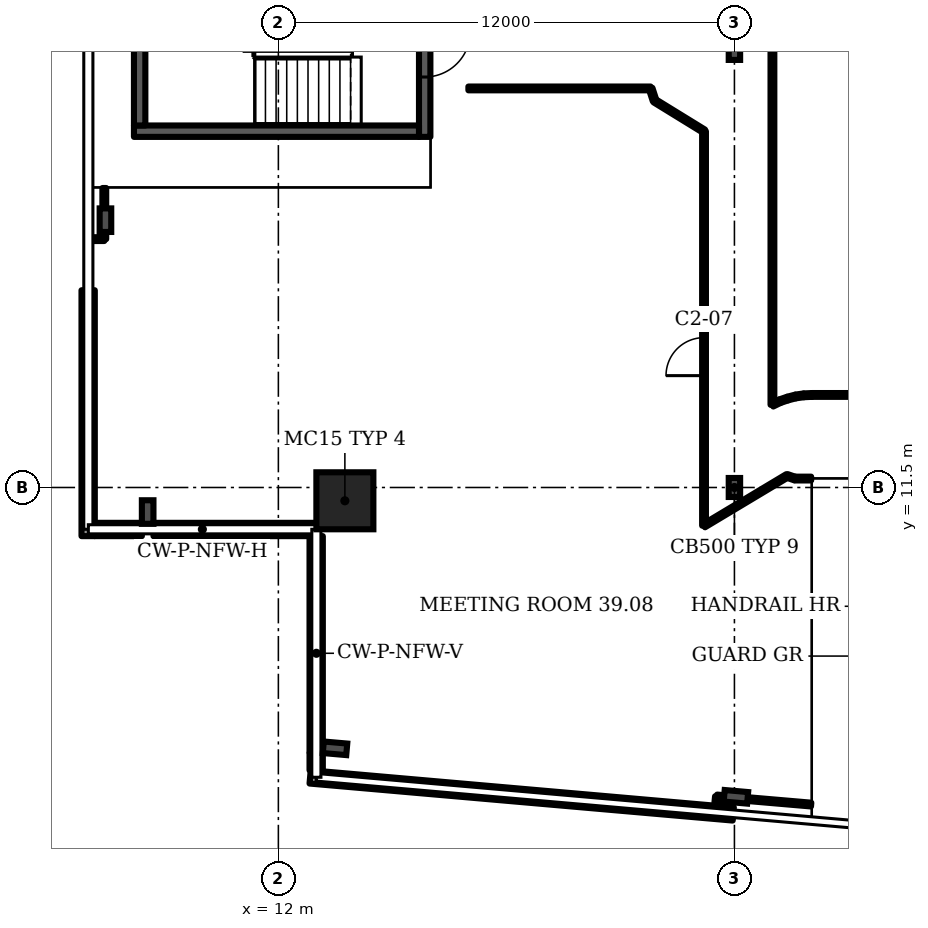
"""IFC4 building model, lengths in metres.
Left out: names, types, materials, properties, quantities, classifications, styles, units other than length and angle.
Written with IfcOpenShell. Run it as: python <this file> out.ifc"""

import sys

from ifc_helpers import new_model, si_unit, direction, frame, frame_2d, origin, origin_2d, place, context, subcontext, project, spatial, rectangle, i_section, extrude, element, fill, save


model = new_model("IFC4")
c1 = context("Model", 3, precision=1e-05, world=origin(), true_north=direction((0.0, 1.0)))
c2 = subcontext(c1, "Body", "Model", "MODEL_VIEW")
j1 = project(units=[si_unit("LENGTHUNIT", "METRE"), si_unit("PLANEANGLEUNIT", "RADIAN")], contexts=[c1])
p1 = place(None, origin())
s1 = spatial("IfcSite", under=j1, at=p1, CompositionType="ELEMENT")
p2 = place(p1, origin())
s2 = spatial("IfcBuilding", under=s1, at=p2, CompositionType="ELEMENT")
p3 = place(p2, frame((0.0, 0.0, 162.7)))
s3 = spatial("IfcBuildingStorey", under=s2, at=p3, CompositionType="ELEMENT", Elevation=162.7)
p4 = place(p3, frame((13.75, 11.15, 0.0), z_axis=(0.0, 0.0, 1.0), x_axis=(1.0, 0.0, 0.0)))
e1 = element("IfcColumn", 1, at=p4, inside=s3, PredefinedType="COLUMN", context=c2, shape_type="SweptSolid", body=[
    extrude(rectangle(XDim=1.5, YDim=1.5, at=origin_2d()), origin(), (0.0, 0.0, 1.0), 3.6),
])
for number, where, z_axis, x_axis in (
    (2, (13.491, 4.637, 0.0), (0.0, 0.0, 1.0), (-0.087, -0.996, 0.0)),
    (3, (24.039, 3.361, 0.0), (0.0, 0.0, 1.0), (-0.087, -0.996, 0.0)),
    (4, (7.45, 18.533, 0.0), (0.0, 0.0, 1.0), (-1.0, 0.0, 0.0)),
    (5, (8.561, 10.854, 0.0), (0.0, 0.0, 1.0), (-1.0, 0.0, 0.0)),
):
    element("IfcColumn", number, at=place(p3, frame(where, z_axis=z_axis, x_axis=x_axis)), inside=s3, PredefinedType="COLUMN", context=c2, shape_type="SweptSolid", body=[
        extrude(i_section(OverallWidth=0.305, OverallDepth=0.62, WebThickness=0.021, FlangeThickness=0.04, FilletRadius=0.027, at=origin_2d()), origin(), (0.0, 0.0, 1.0), 3.6),
    ])
for number, where, z_axis, x_axis in (
    (6, (24.0, 11.5, 0.0), (0.0, 0.0, 1.0), (1.0, 0.0, 0.0)),
    (7, (24.0, 23.0, 0.0), (0.0, 0.0, 1.0), (1.0, 0.0, 0.0)),
):
    element("IfcColumn", number, at=place(p3, frame(where, z_axis=z_axis, x_axis=x_axis)), inside=s3, PredefinedType="COLUMN", context=c2, shape_type="SweptSolid", body=[
        extrude(i_section(OverallWidth=0.3, OverallDepth=0.5, WebThickness=0.014, FlangeThickness=0.028, FilletRadius=0.027, at=origin_2d()), origin(), (0.0, 0.0, 1.0), 3.6),
    ])
p5 = place(p3, frame((12.835, 3.885, 0.0), z_axis=(0.0, 0.0, 1.0), x_axis=(0.996199, -0.087154, 0.0)))
e8 = element("IfcWall", 8, at=p5, inside=s3, PredefinedType="SOLIDWALL", context=c2, shape_type="SweptSolid", body=[
    extrude(rectangle(XDim=11.177, YDim=0.35, at=frame_2d((5.588, 0.0))), origin(), (0.0, 0.0, 1.0), 1.0),
])
p6 = place(p3, frame((6.995, 16.69, 0.0), z_axis=(0.0, 0.0, 1.0), x_axis=(0.0, -1.0, 0.0)))
e9 = element("IfcWall", 9, at=p6, inside=s3, PredefinedType="SOLIDWALL", context=c2, shape_type="SweptSolid", body=[
    extrude(rectangle(XDim=6.47, YDim=0.35, at=frame_2d((3.235, 0.0))), origin(), (0.0, 0.0, 1.0), 1.0),
])
p7 = place(p3, frame((7.17, 10.395, 0.0), z_axis=(0.0, 0.0, 1.0), x_axis=(1.0, 0.0, 0.0)))
e10 = element("IfcWall", 10, at=p7, inside=s3, PredefinedType="SOLIDWALL", context=c2, shape_type="SweptSolid", body=[
    extrude(rectangle(XDim=1.238, YDim=0.35, at=frame_2d((0.619, 0.0))), origin(), (0.0, 0.0, 1.0), 1.0),
])
p8 = place(p3, frame((8.713, 10.395, 0.0), z_axis=(0.0, 0.0, 1.0), x_axis=(1.0, 0.0, 0.0)))
e11 = element("IfcWall", 11, at=p8, inside=s3, PredefinedType="SOLIDWALL", context=c2, shape_type="SweptSolid", body=[
    extrude(rectangle(XDim=4.287, YDim=0.35, at=frame_2d((2.143, 0.0))), origin(), (0.0, 0.0, 1.0), 1.0),
])
p9 = place(p3, frame((12.995, 10.22, 0.0), z_axis=(0.0, 0.0, 1.0), x_axis=(0.0, -1.0, 0.0)))
e12 = element("IfcWall", 12, at=p9, inside=s3, PredefinedType="SOLIDWALL", context=c2, shape_type="SweptSolid", body=[
    extrude(rectangle(XDim=5.693, YDim=0.35, at=frame_2d((2.847, 0.0))), origin(), (0.0, 0.0, 1.0), 1.0),
])
p10 = place(p3, frame((12.995, 4.512, 0.0), z_axis=(0.0, 0.0, 1.0), x_axis=(0.0, -1.0, 0.0)))
e13 = element("IfcWall", 13, at=p10, inside=s3, PredefinedType="SOLIDWALL", context=c2, shape_type="SweptSolid", body=[
    extrude(rectangle(XDim=0.454, YDim=0.35, at=frame_2d((0.227, 0.0))), origin(), (0.0, 0.0, 1.0), 1.0),
])
p11 = place(p3, frame((15.85, 20.725, 0.0), z_axis=(0.0, 0.0, 1.0), x_axis=(0.0, 1.0, 0.0)))
e14 = element("IfcWall", 14, at=p11, inside=s3, PredefinedType="SHEAR", context=c2, shape_type="SweptSolid", body=[
    extrude(rectangle(XDim=4.35, YDim=0.3, at=frame_2d((2.175, 0.0))), origin(), (0.0, 0.0, 1.0), 3.2),
])
p12 = place(p11, frame((1.575, 0.0, 0.0)))
e15 = element("IfcOpeningElement", 15, at=p12, cuts=e14, PredefinedType="OPENING", context=c2, shape_type="SweptSolid", body=[
    extrude(rectangle(XDim=1.2, YDim=2.1, at=frame_2d((0.6, 1.05))), frame((0.0, 0.16, 0.0), z_axis=(0.0, -1.0, 0.0), x_axis=(1.0, 0.0, 0.0)), (0.0, 0.0, 1.0), 0.32),
])
p13 = place(p3, frame((7.02, 18.035, 0.0), z_axis=(0.0, 0.0, 1.0), x_axis=(1.0, 0.0, 0.0)))
e16 = element("IfcWall", 16, at=p13, inside=s3, PredefinedType="PARTITIONING", context=c2, shape_type="SweptSolid", body=[
    extrude(rectangle(XDim=0.4, YDim=0.1, at=frame_2d((0.2, 0.0))), origin(), (0.0, 0.0, 1.0), 3.2),
])
p14 = place(p3, frame((7.42, 18.035, 0.0), z_axis=(0.0, 0.0, 1.0), x_axis=(0.0, 1.0, 0.0)))
e17 = element("IfcWall", 17, at=p14, inside=s3, PredefinedType="PARTITIONING", context=c2, shape_type="SweptSolid", body=[
    extrude(rectangle(XDim=1.345, YDim=0.1, at=frame_2d((0.672, 0.0))), origin(), (0.0, 0.0, 1.0), 2.58),
])
p15 = place(p3, frame((17.0, 22.0, 0.0), z_axis=(0.0, 0.0, 1.0), x_axis=(1.0, 0.0, 0.0)))
e18 = element("IfcWall", 18, at=p15, inside=s3, PredefinedType="PARTITIONING", context=c2, shape_type="SweptSolid", body=[
    extrude(rectangle(XDim=4.795, YDim=0.1, at=frame_2d((2.397, 0.0))), origin(), (0.0, 0.0, 1.0), 3.2),
])
p16 = place(p3, frame((21.9, 21.675, 0.0), z_axis=(0.0, 0.0, 1.0), x_axis=(-0.30742, 0.951572, 0.0)))
e19 = element("IfcWall", 19, at=p16, inside=s3, PredefinedType="PARTITIONING", context=c2, shape_type="SweptSolid", body=[
    extrude(rectangle(XDim=0.342, YDim=0.1, at=frame_2d((0.171, 0.0))), origin(), (0.0, 0.0, 1.0), 3.2),
])
p17 = place(p3, frame((23.2, 20.875, 0.0), z_axis=(0.0, 0.0, 1.0), x_axis=(-0.851649, 0.524104, 0.0)))
e20 = element("IfcWall", 20, at=p17, inside=s3, PredefinedType="PARTITIONING", context=c2, shape_type="SweptSolid", body=[
    extrude(rectangle(XDim=1.527, YDim=0.1, at=frame_2d((0.763, 0.0))), origin(), (0.0, 0.0, 1.0), 3.2),
])
p18 = place(p3, frame((23.2, 10.495, 0.0), z_axis=(0.0, 0.0, 1.0), x_axis=(0.857707, 0.514145, 0.0)))
e21 = element("IfcWall", 21, at=p18, inside=s3, PredefinedType="PARTITIONING", context=c2, shape_type="SweptSolid", body=[
    extrude(rectangle(XDim=2.548, YDim=0.1, at=frame_2d((1.274, 0.0))), origin(), (0.0, 0.0, 1.0), 3.2),
])
p19 = place(p3, frame((23.2, 10.495, 0.0), z_axis=(0.0, 0.0, 1.0), x_axis=(0.0, 1.0, 0.0)))
e22 = element("IfcWall", 22, at=p19, inside=s3, PredefinedType="PARTITIONING", context=c2, shape_type="SweptSolid", body=[
    extrude(rectangle(XDim=10.38, YDim=0.1, at=frame_2d((5.19, 0.0))), origin(), (0.0, 0.0, 1.0), 3.2),
])
p20 = place(p19, frame((3.948, 0.0, 0.0)))
e23 = element("IfcOpeningElement", 23, at=p20, cuts=e22, PredefinedType="OPENING", context=c2, shape_type="SweptSolid", body=[
    extrude(rectangle(XDim=1.0, YDim=2.1, at=frame_2d((0.5, 1.05))), frame((0.0, 0.06, 0.0), z_axis=(0.0, -1.0, 0.0), x_axis=(1.0, 0.0, 0.0)), (0.0, 0.0, 1.0), 0.12),
])
p21 = place(p3, frame((23.502, 2.976, 0.0), z_axis=(0.0, 0.0, 1.0), x_axis=(0.095654, 0.995419, 0.0)))
e24 = element("IfcWall", 24, at=p21, inside=s3, PredefinedType="PARTITIONING", context=c2, shape_type="SweptSolid", body=[
    extrude(rectangle(XDim=0.396, YDim=0.1, at=frame_2d((0.198, 0.0))), origin(), (0.0, 0.0, 1.0), 3.2),
])
p22 = place(p3, frame((25.0, 13.675, 0.0), z_axis=(0.0, 0.0, 1.0), x_axis=(0.0, 1.0, 0.0)))
e25 = element("IfcWall", 25, at=p22, inside=s3, PredefinedType="PARTITIONING", context=c2, shape_type="SweptSolid", body=[
    extrude(rectangle(XDim=11.825, YDim=0.1, at=frame_2d((5.913, 0.0))), origin(), (0.0, 0.0, 1.0), 3.2),
])
p23 = place(p3, frame((25.0, 13.675, 0.0), z_axis=(0.0, 0.0, 1.0), x_axis=(0.899103, 0.437736, 0.0)))
e26 = element("IfcWall", 26, at=p23, inside=s3, PredefinedType="PARTITIONING", context=c2, shape_type="SweptSolid", body=[
    extrude(rectangle(XDim=0.217, YDim=0.1, at=frame_2d((0.108, 0.0))), origin(), (0.0, 0.0, 1.0), 3.2),
])
p24 = place(p3, frame((25.195, 13.77, 0.0), z_axis=(0.0, 0.0, 1.0), x_axis=(0.94617, 0.32366, 0.0)))
e27 = element("IfcWall", 27, at=p24, inside=s3, PredefinedType="PARTITIONING", context=c2, shape_type="SweptSolid", body=[
    extrude(rectangle(XDim=0.217, YDim=0.1, at=frame_2d((0.108, 0.0))), origin(), (0.0, 0.0, 1.0), 3.2),
])
p25 = place(p3, frame((25.4, 13.84, 0.0), z_axis=(0.0, 0.0, 1.0), x_axis=(0.967508, 0.252833, 0.0)))
e28 = element("IfcWall", 28, at=p25, inside=s3, PredefinedType="PARTITIONING", context=c2, shape_type="SweptSolid", body=[
    extrude(rectangle(XDim=0.217, YDim=0.1, at=frame_2d((0.109, 0.0))), origin(), (0.0, 0.0, 1.0), 3.2),
])
p26 = place(p3, frame((25.59, 11.735, 0.0), z_axis=(0.0, 0.0, 1.0), x_axis=(1.0, 0.0, 0.0)))
e29 = element("IfcWall", 29, at=p26, inside=s3, PredefinedType="PARTITIONING", context=c2, shape_type="SweptSolid", body=[
    extrude(rectangle(XDim=0.429, YDim=0.1, at=frame_2d((0.215, 0.0))), origin(), (0.0, 0.0, 1.0), 3.2),
])
p27 = place(p3, frame((25.59, 11.735, 0.0), z_axis=(0.0, 0.0, 1.0), x_axis=(-0.946633, 0.322306, 0.0)))
e30 = element("IfcWall", 30, at=p27, inside=s3, PredefinedType="PARTITIONING", context=c2, shape_type="SweptSolid", body=[
    extrude(rectangle(XDim=0.217, YDim=0.1, at=frame_2d((0.108, 0.0))), origin(), (0.0, 0.0, 1.0), 3.2),
])
p28 = place(p3, frame((25.61, 13.895, 0.0), z_axis=(0.0, 0.0, 1.0), x_axis=(0.990372, 0.138427, 0.0)))
e31 = element("IfcWall", 31, at=p28, inside=s3, PredefinedType="PARTITIONING", context=c2, shape_type="SweptSolid", body=[
    extrude(rectangle(XDim=0.217, YDim=0.1, at=frame_2d((0.108, 0.0))), origin(), (0.0, 0.0, 1.0), 3.2),
])
p29 = place(p3, frame((25.825, 13.925, 0.0), z_axis=(0.0, 0.0, 1.0), x_axis=(0.998923, 0.046488, 0.0)))
e32 = element("IfcWall", 32, at=p29, inside=s3, PredefinedType="PARTITIONING", context=c2, shape_type="SweptSolid", body=[
    extrude(rectangle(XDim=0.215, YDim=0.1, at=frame_2d((0.108, 0.0))), origin(), (0.0, 0.0, 1.0), 3.2),
])
p30 = place(p3, frame((26.019, 3.157, 0.0), z_axis=(0.0, 0.0, 1.0), x_axis=(-0.996317, 0.085749, 0.0)))
e33 = element("IfcWall", 33, at=p30, inside=s3, PredefinedType="PARTITIONING", context=c2, shape_type="SweptSolid", body=[
    extrude(rectangle(XDim=2.489, YDim=0.1, at=frame_2d((1.244, 0.0))), origin(), (0.0, 0.0, 1.0), 2.58),
])
p31 = place(p3, frame((26.04, 13.935, 0.0), z_axis=(0.0, 0.0, 1.0), x_axis=(1.0, 0.0, 0.0)))
e34 = element("IfcWall", 34, at=p31, inside=s3, PredefinedType="PARTITIONING", context=c2, shape_type="SweptSolid", body=[
    extrude(rectangle(XDim=7.0, YDim=0.1, at=frame_2d((3.5, 0.0))), origin(), (0.0, 0.0, 1.0), 3.2),
])
p32 = place(p3, frame((8.2, 20.875, 0.0), z_axis=(0.0, 0.0, 1.0), x_axis=(1.0, 0.0, 0.0)))
e35 = element("IfcWall", 35, at=p32, inside=s3, PredefinedType="SHEAR", context=c2, shape_type="SweptSolid", body=[
    extrude(rectangle(XDim=7.5, YDim=0.3, at=frame_2d((3.75, 0.0))), origin(), (0.0, 0.0, 1.0), 3.2),
])
p33 = place(p3, frame((8.35, 21.025, 0.0), z_axis=(0.0, 0.0, 1.0), x_axis=(0.0, 1.0, 0.0)))
e36 = element("IfcWall", 36, at=p33, inside=s3, PredefinedType="SHEAR", context=c2, shape_type="SweptSolid", body=[
    extrude(rectangle(XDim=3.75, YDim=0.3, at=frame_2d((1.875, 0.0))), origin(), (0.0, 0.0, 1.0), 3.2),
])
p34 = place(p12, origin())
e37 = element("IfcDoor", 37, at=p34, inside=s3, OperationType="SINGLE_SWING_RIGHT", PredefinedType="DOOR", context=c2, shape_type="SweptSolid", body=[
    extrude(rectangle(XDim=1.2, YDim=2.1, at=frame_2d((0.6, 1.05))), frame((0.0, 0.025, 0.0), z_axis=(0.0, -1.0, 0.0), x_axis=(1.0, 0.0, 0.0)), (0.0, 0.0, 1.0), 0.05),
])
fill(e15, e37)
p35 = place(p20, origin())
e38 = element("IfcDoor", 38, at=p35, inside=s3, OperationType="SINGLE_SWING_LEFT", PredefinedType="DOOR", context=c2, shape_type="SweptSolid", body=[
    extrude(rectangle(XDim=1.0, YDim=2.1, at=frame_2d((0.5, 1.05))), frame((0.0, 0.025, 0.0), z_axis=(0.0, -1.0, 0.0), x_axis=(1.0, 0.0, 0.0)), (0.0, 0.0, 1.0), 0.05),
])
fill(e23, e38)
save(model, sys.argv[1])
